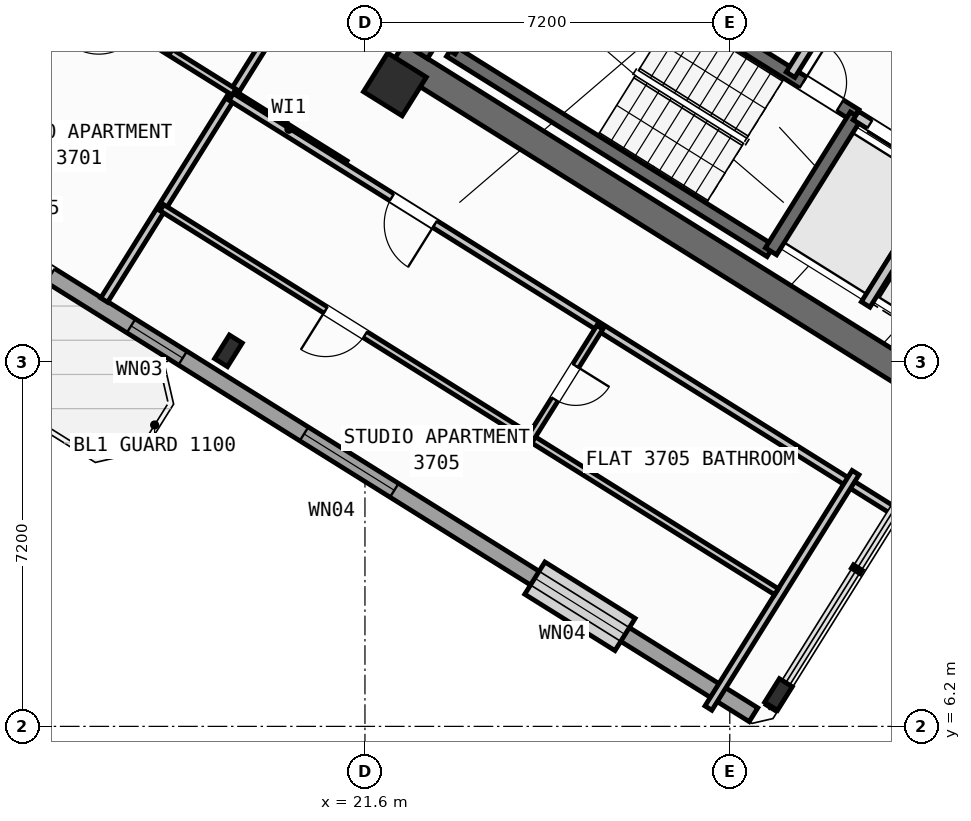
"""IFC4 building model, lengths in metres.
Left out: names, types, materials, properties, quantities, classifications, styles, units other than length and angle.
Written with IfcOpenShell. Run it as: python <this file> out.ifc"""

import sys

from ifc_helpers import new_model, si_unit, direction, frame, frame_2d, origin, origin_2d, place, context, subcontext, project, spatial, rectangle, hollow_rectangle, i_section, extrude, source, transform, mapped, element, fill, save


model = new_model("IFC4")
c1 = context("Model", 3, precision=1e-05, world=origin(), true_north=direction((0.0, 1.0)))
c2 = subcontext(c1, "Body", "Model", "MODEL_VIEW")
j1 = project(units=[si_unit("LENGTHUNIT", "METRE"), si_unit("PLANEANGLEUNIT", "RADIAN")], contexts=[c1])
p1 = place(None, origin())
s1 = spatial("IfcSite", under=j1, at=p1, CompositionType="ELEMENT")
p2 = place(p1, origin())
s2 = spatial("IfcBuilding", under=s1, at=p2, CompositionType="ELEMENT")
p3 = place(p2, frame((0.0, 0.0, 147.9)))
s3 = spatial("IfcBuildingStorey", under=s2, at=p3, CompositionType="ELEMENT", Elevation=147.9)
p4 = place(p3, frame((33.366, 12.477, 0.0), z_axis=(0.0, 0.0, 1.0), x_axis=(-0.848047359947, 0.529920442413, 0.0)))
e1 = element("IfcWall", 1, at=p4, inside=s3, PredefinedType="SHEAR", context=c2, shape_type="SweptSolid", body=[
    extrude(rectangle(XDim=13.14, YDim=0.55, at=frame_2d((6.57, 0.0))), origin(), (0.0, 0.0, 1.0), 3.35),
])
p5 = place(p3, frame((26.007, 24.976, 0.0), z_axis=(0.0, 0.0, 1.0), x_axis=(-0.529923795287, -0.848045264823, 0.0)))
e2 = element("IfcWall", 2, at=p5, inside=s3, PredefinedType="SHEAR", context=c2, shape_type="SweptSolid", body=[
    extrude(rectangle(XDim=6.425, YDim=0.55, at=frame_2d((3.212, 0.0))), origin(), (0.0, 0.0, 1.0), 3.35),
])
m1 = source(origin(), c2, "Body", "SweptSolid", [
    extrude(i_section(OverallWidth=0.3, OverallDepth=0.55, WebThickness=0.015, FlangeThickness=0.029, at=origin_2d()), origin(), (0.0, 0.0, 1.0), 3.6),
])
p6 = place(p3, frame((29.761, 6.829, 0.0), z_axis=(0.0, 0.0, 1.0), x_axis=(-0.848048096156, 0.529919264233, 0.0)))
e3 = element("IfcColumn", 3, at=p6, inside=s3, PredefinedType="COLUMN", context=c2, shape_type="MappedRepresentation", body=[
    mapped(m1, transform((0.0, 0.0, 0.0), scale=1.0)),
])
m2 = source(origin(), c2, "Body", "SweptSolid", [
    extrude(hollow_rectangle(XDim=0.9, YDim=0.9, WallThickness=0.036, at=origin_2d()), origin(), (0.0, 0.0, 1.0), 3.6),
])
p7 = place(p3, frame((22.191, 18.87, 0.0), z_axis=(0.0, 0.0, 1.0), x_axis=(-0.848048096156, 0.529919264233, 0.0)))
e4 = element("IfcColumn", 4, at=p7, inside=s3, PredefinedType="COLUMN", context=c2, shape_type="MappedRepresentation", body=[
    mapped(m2, transform((0.0, 0.0, 0.0), scale=1.0)),
])
p8 = place(p3, frame((18.906, 13.612, 0.0), z_axis=(0.0, 0.0, 1.0), x_axis=(-0.848048096156, 0.529919264233, 0.0)))
e5 = element("IfcColumn", 5, at=p8, inside=s3, PredefinedType="COLUMN", context=c2, shape_type="MappedRepresentation", body=[
    mapped(m1, transform((0.0, 0.0, 0.0), scale=1.0)),
])
p9 = place(p3, frame((29.268, 6.429, 0.0), z_axis=(0.0, 0.0, 1.0), x_axis=(-0.848049971435, 0.529916263149, 0.0)))
e6 = element("IfcWall", 6, at=p9, inside=s3, PredefinedType="STANDARD", context=c2, shape_type="SweptSolid", body=[
    extrude(rectangle(XDim=31.588, YDim=0.32, at=frame_2d((15.794, 0.0))), origin(), (0.0, 0.0, 1.0), 3.35),
])
p10 = place(p9, frame((16.362, 0.0, 0.0)))
e7 = element("IfcOpeningElement", 7, at=p10, cuts=e6, PredefinedType="OPENING", context=c2, shape_type="SweptSolid", body=[
    extrude(rectangle(XDim=1.2, YDim=2.15, at=frame_2d((0.6, 1.075))), frame((0.0, 0.17, 0.0), z_axis=(0.0, -1.0, 0.0), x_axis=(1.0, 0.0, 0.0)), (0.0, 0.0, 1.0), 0.34),
])
p11 = place(p9, frame((2.989, 0.0, 0.8)))
e8 = element("IfcOpeningElement", 8, at=p11, cuts=e6, PredefinedType="OPENING", context=c2, shape_type="SweptSolid", body=[
    extrude(rectangle(XDim=2.1, YDim=1.55, at=frame_2d((1.05, 0.775))), frame((0.0, 0.17, 0.0), z_axis=(0.0, -1.0, 0.0), x_axis=(1.0, 0.0, 0.0)), (0.0, 0.0, 1.0), 0.34),
])
p12 = place(p9, frame((8.359, 0.0, 0.8)))
e9 = element("IfcOpeningElement", 9, at=p12, cuts=e6, PredefinedType="OPENING", context=c2, shape_type="SweptSolid", body=[
    extrude(rectangle(XDim=2.1, YDim=1.55, at=frame_2d((1.05, 0.775))), frame((0.0, 0.17, 0.0), z_axis=(0.0, -1.0, 0.0), x_axis=(1.0, 0.0, 0.0)), (0.0, 0.0, 1.0), 0.34),
])
p13 = place(p9, frame((13.284, 0.0, 0.95)))
e10 = element("IfcOpeningElement", 10, at=p13, cuts=e6, PredefinedType="OPENING", context=c2, shape_type="SweptSolid", body=[
    extrude(rectangle(XDim=1.2, YDim=1.4, at=frame_2d((0.6, 0.7))), frame((0.0, 0.17, 0.0), z_axis=(0.0, -1.0, 0.0), x_axis=(1.0, 0.0, 0.0)), (0.0, 0.0, 1.0), 0.34),
])
p14 = place(p9, frame((29.188, 0.0, 0.95)))
e11 = element("IfcOpeningElement", 11, at=p14, cuts=e6, PredefinedType="OPENING", context=c2, shape_type="SweptSolid", body=[
    extrude(rectangle(XDim=1.2, YDim=1.4, at=frame_2d((0.6, 0.7))), frame((0.0, 0.17, 0.0), z_axis=(0.0, -1.0, 0.0), x_axis=(1.0, 0.0, 0.0)), (0.0, 0.0, 1.0), 0.34),
])
p15 = place(p9, frame((19.674, 0.0, 1.0)))
e12 = element("IfcOpeningElement", 12, at=p15, cuts=e6, PredefinedType="OPENING", context=c2, shape_type="SweptSolid", body=[
    extrude(rectangle(XDim=0.9, YDim=1.25, at=frame_2d((0.45, 0.625))), frame((0.0, 0.17, 0.0), z_axis=(0.0, -1.0, 0.0), x_axis=(1.0, 0.0, 0.0)), (0.0, 0.0, 1.0), 0.34),
])
p16 = place(p9, frame((21.896, 0.0, 1.0)))
e13 = element("IfcOpeningElement", 13, at=p16, cuts=e6, PredefinedType="OPENING", context=c2, shape_type="SweptSolid", body=[
    extrude(rectangle(XDim=0.9, YDim=1.25, at=frame_2d((0.45, 0.625))), frame((0.0, 0.17, 0.0), z_axis=(0.0, -1.0, 0.0), x_axis=(1.0, 0.0, 0.0)), (0.0, 0.0, 1.0), 0.34),
])
p17 = place(p9, frame((24.106, 0.0, 1.0)))
e14 = element("IfcOpeningElement", 14, at=p17, cuts=e6, PredefinedType="OPENING", context=c2, shape_type="SweptSolid", body=[
    extrude(rectangle(XDim=0.65, YDim=1.15, at=frame_2d((0.325, 0.575))), frame((0.0, 0.17, 0.0), z_axis=(0.0, -1.0, 0.0), x_axis=(1.0, 0.0, 0.0)), (0.0, 0.0, 1.0), 0.34),
])
p18 = place(p9, frame((26.366, 0.0, 1.0)))
e15 = element("IfcOpeningElement", 15, at=p18, cuts=e6, PredefinedType="OPENING", context=c2, shape_type="SweptSolid", body=[
    extrude(rectangle(XDim=0.9, YDim=1.25, at=frame_2d((0.45, 0.625))), frame((0.0, 0.17, 0.0), z_axis=(0.0, -1.0, 0.0), x_axis=(1.0, 0.0, 0.0)), (0.0, 0.0, 1.0), 0.34),
])
p19 = place(p3, frame((29.605, 15.581, 0.0), z_axis=(0.0, 0.0, 1.0), x_axis=(-0.848036911448, 0.529937163087, 0.0)))
e16 = element("IfcWall", 16, at=p19, inside=s3, PredefinedType="SHEAR", context=c2, shape_type="SweptSolid", body=[
    extrude(rectangle(XDim=7.46, YDim=0.26, at=frame_2d((3.73, 0.0))), origin(), (0.0, 0.0, 1.0), 3.35),
])
p20 = place(p3, frame((31.28, 18.261, 0.0), z_axis=(0.0, 0.0, 1.0), x_axis=(-0.848051618787, 0.529913626805, 0.0)))
e17 = element("IfcWall", 17, at=p20, inside=s3, PredefinedType="SHEAR", context=c2, shape_type="SweptSolid", body=[
    extrude(rectangle(XDim=7.46, YDim=0.26, at=frame_2d((3.73, 0.0))), origin(), (0.0, 0.0, 1.0), 3.35),
])
p21 = place(p20, frame((0.36, 0.0, 0.0)))
e18 = element("IfcOpeningElement", 18, at=p21, cuts=e17, PredefinedType="OPENING", context=c2, shape_type="SweptSolid", body=[
    extrude(rectangle(XDim=0.86, YDim=2.05, at=frame_2d((0.43, 1.025))), frame((0.0, 0.14, 0.0), z_axis=(0.0, -1.0, 0.0), x_axis=(1.0, 0.0, 0.0)), (0.0, 0.0, 1.0), 0.28),
])
p22 = place(p3, frame((31.288, 18.256, 0.0), z_axis=(0.0, 0.0, 1.0), x_axis=(-0.529943379326, -0.848033026897, 0.0)))
e19 = element("IfcWall", 19, at=p22, inside=s3, PredefinedType="SHEAR", context=c2, shape_type="SweptSolid", body=[
    extrude(rectangle(XDim=3.16, YDim=0.26, at=frame_2d((1.58, 0.0))), origin(), (0.0, 0.0, 1.0), 3.35),
])
p23 = place(p3, frame((24.945, 22.22, 0.0), z_axis=(0.0, 0.0, 1.0), x_axis=(-0.529908658664, -0.84805472316, 0.0)))
e20 = element("IfcWall", 20, at=p23, inside=s3, PredefinedType="SHEAR", context=c2, shape_type="SweptSolid", body=[
    extrude(rectangle(XDim=3.16, YDim=0.26, at=frame_2d((1.58, 0.0))), origin(), (0.0, 0.0, 1.0), 3.35),
])
p24 = place(p3, frame((34.891, 16.005, 0.0), z_axis=(0.0, 0.0, 1.0), x_axis=(-0.848062873452, 0.529895614884, 0.0)))
e21 = element("IfcWall", 21, at=p24, inside=s3, PredefinedType="STANDARD", context=c2, shape_type="SweptSolid", body=[
    extrude(rectangle(XDim=4.248, YDim=0.2, at=frame_2d((2.124, 0.0))), origin(), (0.0, 0.0, 1.0), 3.34),
])
p25 = place(p24, frame((0.398, 0.0, 0.0)))
e22 = element("IfcOpeningElement", 22, at=p25, cuts=e21, PredefinedType="OPENING", context=c2, shape_type="SweptSolid", body=[
    extrude(rectangle(XDim=1.3, YDim=2.2, at=frame_2d((0.65, 1.1))), frame((0.0, 0.11, 0.0), z_axis=(0.0, -1.0, 0.0), x_axis=(1.0, 0.0, 0.0)), (0.0, 0.0, 1.0), 0.22),
])
p26 = place(p24, frame((2.473, 0.0, 0.0)))
e23 = element("IfcOpeningElement", 23, at=p26, cuts=e21, PredefinedType="OPENING", context=c2, shape_type="SweptSolid", body=[
    extrude(rectangle(XDim=1.45, YDim=2.25, at=frame_2d((0.725, 1.125))), frame((0.0, 0.11, 0.0), z_axis=(0.0, -1.0, 0.0), x_axis=(1.0, 0.0, 0.0)), (0.0, 0.0, 1.0), 0.22),
])
p27 = place(p3, frame((36.417, 18.447, 0.0), z_axis=(0.0, 0.0, 1.0), x_axis=(-0.848064879198, 0.529892404805, 0.0)))
e24 = element("IfcWall", 24, at=p27, inside=s3, PredefinedType="STANDARD", context=c2, shape_type="SweptSolid", body=[
    extrude(rectangle(XDim=5.768, YDim=0.2, at=frame_2d((2.884, 0.0))), origin(), (0.0, 0.0, 1.0), 3.34),
])
p28 = place(p27, frame((2.548, 0.0, 0.0)))
e25 = element("IfcOpeningElement", 25, at=p28, cuts=e24, PredefinedType="OPENING", context=c2, shape_type="SweptSolid", body=[
    extrude(rectangle(XDim=1.15, YDim=2.1, at=frame_2d((0.575, 1.05))), frame((0.0, 0.11, 0.0), z_axis=(0.0, -1.0, 0.0), x_axis=(1.0, 0.0, 0.0)), (0.0, 0.0, 1.0), 0.22),
])
p29 = place(p3, frame((33.029, 17.003, 0.0), z_axis=(0.0, 0.0, 1.0), x_axis=(-0.529916267533, -0.848049968695, 0.0)))
e26 = element("IfcWall", 26, at=p29, inside=s3, PredefinedType="STANDARD", context=c2, shape_type="SweptSolid", body=[
    extrude(rectangle(XDim=2.92, YDim=0.2, at=frame_2d((1.46, 0.0))), origin(), (0.0, 0.0, 1.0), 3.34),
])
p30 = place(p3, frame((31.525, 21.504, 0.0), z_axis=(0.0, 0.0, 1.0), x_axis=(-0.529907497854, -0.848055448493, 0.0)))
e27 = element("IfcWall", 27, at=p30, inside=s3, PredefinedType="STANDARD", context=c2, shape_type="SweptSolid", body=[
    extrude(rectangle(XDim=2.88, YDim=0.2, at=frame_2d((1.44, 0.0))), origin(), (0.0, 0.0, 1.0), 3.34),
])
p31 = place(p3, frame((21.206, 17.292, 0.0), z_axis=(0.0, 0.0, 1.0), x_axis=(-0.848050851465, 0.529914854792, 0.0)))
e28 = element("IfcWall", 28, at=p31, inside=s3, PredefinedType="PARTITIONING", context=c2, shape_type="SweptSolid", body=[
    extrude(rectangle(XDim=2.61, YDim=0.16, at=frame_2d((1.305, 0.0))), origin(), (0.0, 0.0, 1.0), 3.34),
])
p32 = place(p3, frame((21.938, 23.391, 0.0), z_axis=(0.0, 0.0, 1.0), x_axis=(-0.529924725692, -0.848044683434, 0.0)))
e29 = element("IfcWall", 29, at=p32, inside=s3, PredefinedType="PARTITIONING", context=c2, shape_type="SweptSolid", body=[
    extrude(rectangle(XDim=10.35, YDim=0.16, at=frame_2d((5.175, 0.0))), origin(), (0.0, 0.0, 1.0), 3.34),
])
p33 = place(p3, frame((16.519, 21.87, 0.0), z_axis=(0.0, 0.0, 1.0), x_axis=(-0.529922447305, -0.848046107144, 0.0)))
e30 = element("IfcWall", 30, at=p33, inside=s3, PredefinedType="PARTITIONING", context=c2, shape_type="SweptSolid", body=[
    extrude(rectangle(XDim=5.451, YDim=0.16, at=frame_2d((2.726, 0.0))), origin(), (0.0, 0.0, 1.0), 2.775),
])
p34 = place(p3, frame((19.019, 18.718, 0.0), z_axis=(0.0, 0.0, 1.0), x_axis=(-0.848059820872, 0.529900500304, 0.0)))
e31 = element("IfcWall", 31, at=p34, inside=s3, PredefinedType="PLUMBINGWALL", context=c2, shape_type="SweptSolid", body=[
    extrude(rectangle(XDim=3.79, YDim=0.14, at=frame_2d((1.895, 0.0))), origin(), (0.0, 0.0, 1.0), 3.34),
])
p35 = place(p34, frame((2.23, 0.0, 0.0)))
e32 = element("IfcOpeningElement", 32, at=p35, cuts=e31, PredefinedType="OPENING", context=c2, shape_type="SweptSolid", body=[
    extrude(rectangle(XDim=0.92, YDim=2.08, at=frame_2d((0.46, 1.04))), frame((0.0, 0.08, 0.0), z_axis=(0.0, -1.0, 0.0), x_axis=(1.0, 0.0, 0.0)), (0.0, 0.0, 1.0), 0.16),
])
p36 = place(p3, frame((20.624, 24.212, 0.0), z_axis=(0.0, 0.0, 1.0), x_axis=(-0.529919283494, -0.848048084121, 0.0)))
e33 = element("IfcWall", 33, at=p36, inside=s3, PredefinedType="PLUMBINGWALL", context=c2, shape_type="SweptSolid", body=[
    extrude(rectangle(XDim=5.51, YDim=0.14, at=frame_2d((2.755, 0.0))), origin(), (0.0, 0.0, 1.0), 2.995),
])
p37 = place(p36, frame((2.365, 0.0, 0.0)))
e34 = element("IfcOpeningElement", 34, at=p37, cuts=e33, PredefinedType="OPENING", context=c2, shape_type="SweptSolid", body=[
    extrude(rectangle(XDim=0.78, YDim=2.05, at=frame_2d((0.39, 1.025))), frame((0.0, 0.08, 0.0), z_axis=(0.0, -1.0, 0.0), x_axis=(1.0, 0.0, 0.0)), (0.0, 0.0, 1.0), 0.16),
])
p38 = place(p3, frame((32.164, 10.374, 0.0), z_axis=(0.0, 0.0, 1.0), x_axis=(-0.848044107957, 0.529925646633, 0.0)))
e35 = element("IfcWall", 35, at=p38, inside=s3, PredefinedType="PARTITIONING", context=c2, shape_type="SweptSolid", body=[
    extrude(rectangle(XDim=15.57, YDim=0.16, at=frame_2d((7.785, 0.0))), origin(), (0.0, 0.0, 1.0), 3.34),
])
p39 = place(p38, frame((10.83, 0.0, 0.0)))
e36 = element("IfcOpeningElement", 36, at=p39, cuts=e35, PredefinedType="OPENING", context=c2, shape_type="SweptSolid", body=[
    extrude(rectangle(XDim=1.0, YDim=2.1, at=frame_2d((0.5, 1.05))), frame((0.0, 0.09, 0.0), z_axis=(0.0, -1.0, 0.0), x_axis=(1.0, 0.0, 0.0)), (0.0, 0.0, 1.0), 0.18),
])
p40 = place(p3, frame((31.282, 11.208, 0.0), z_axis=(0.0, 0.0, 1.0), x_axis=(-0.529938869374, -0.84803584519, 0.0)))
e37 = element("IfcWall", 37, at=p40, inside=s3, PredefinedType="PARTITIONING", context=c2, shape_type="SweptSolid", body=[
    extrude(rectangle(XDim=5.48, YDim=0.16, at=frame_2d((2.74, 0.0))), origin(), (0.0, 0.0, 1.0), 3.34),
])
p41 = place(p3, frame((29.72, 8.859, 0.0), z_axis=(0.0, 0.0, 1.0), x_axis=(-0.848049134363, 0.529917602752, 0.0)))
e38 = element("IfcWall", 38, at=p41, inside=s3, PredefinedType="PLUMBINGWALL", context=c2, shape_type="SweptSolid", body=[
    extrude(rectangle(XDim=14.3, YDim=0.14, at=frame_2d((7.15, 0.0))), origin(), (0.0, 0.0, 1.0), 3.34),
])
p42 = place(p41, frame((9.57, 0.0, 0.0)))
e39 = element("IfcOpeningElement", 39, at=p42, cuts=e38, PredefinedType="OPENING", context=c2, shape_type="SweptSolid", body=[
    extrude(rectangle(XDim=0.92, YDim=2.08, at=frame_2d((0.46, 1.04))), frame((0.0, 0.08, 0.0), z_axis=(0.0, -1.0, 0.0), x_axis=(1.0, 0.0, 0.0)), (0.0, 0.0, 1.0), 0.16),
])
p43 = place(p3, frame((26.237, 14.078, 0.0), z_axis=(0.0, 0.0, 1.0), x_axis=(-0.52995640672, -0.848024885824, 0.0)))
e40 = element("IfcWall", 40, at=p43, inside=s3, PredefinedType="PLUMBINGWALL", context=c2, shape_type="SweptSolid", body=[
    extrude(rectangle(XDim=2.58, YDim=0.14, at=frame_2d((1.29, 0.0))), origin(), (0.0, 0.0, 1.0), 3.34),
])
p44 = place(p43, frame((0.9, 0.0, 0.0)))
e41 = element("IfcOpeningElement", 41, at=p44, cuts=e40, PredefinedType="OPENING", context=c2, shape_type="SweptSolid", body=[
    extrude(rectangle(XDim=0.78, YDim=2.05, at=frame_2d((0.39, 1.025))), frame((0.0, 0.08, 0.0), z_axis=(0.0, -1.0, 0.0), x_axis=(1.0, 0.0, 0.0)), (0.0, 0.0, 1.0), 0.16),
])
m3 = source(origin(), c2, "Body", "SweptSolid", [
    extrude(rectangle(XDim=2.1, YDim=1.55, at=frame_2d((1.05, 0.775))), frame((0.0, 0.03, 0.0), z_axis=(0.0, -1.0, 0.0), x_axis=(1.0, 0.0, 0.0)), (0.0, 0.0, 1.0), 0.06),
])
p45 = place(p11, origin())
e42 = element("IfcWindow", 42, at=p45, inside=s3, PartitioningType="SINGLE_PANEL", PredefinedType="WINDOW", context=c2, shape_type="MappedRepresentation", body=[
    mapped(m3, transform((0.0, 0.0, 0.0), scale=1.0)),
])
fill(e8, e42)
p46 = place(p12, origin())
e43 = element("IfcWindow", 43, at=p46, inside=s3, PartitioningType="SINGLE_PANEL", PredefinedType="WINDOW", context=c2, shape_type="MappedRepresentation", body=[
    mapped(m3, transform((0.0, 0.0, 0.0), scale=1.0)),
])
fill(e9, e43)
m4 = source(origin(), c2, "Body", "SweptSolid", [
    extrude(rectangle(XDim=1.2, YDim=1.4, at=frame_2d((0.6, 0.7))), frame((0.0, 0.03, 0.0), z_axis=(0.0, -1.0, 0.0), x_axis=(1.0, 0.0, 0.0)), (0.0, 0.0, 1.0), 0.06),
])
p47 = place(p13, origin())
e44 = element("IfcWindow", 44, at=p47, inside=s3, PartitioningType="SINGLE_PANEL", PredefinedType="WINDOW", context=c2, shape_type="MappedRepresentation", body=[
    mapped(m4, transform((0.0, 0.0, 0.0), scale=1.0)),
])
fill(e10, e44)
m5 = source(origin(), c2, "Body", "SweptSolid", [
    extrude(rectangle(XDim=0.86, YDim=2.05, at=frame_2d((0.43, 1.025))), frame((0.0, 0.025, 0.0), z_axis=(0.0, -1.0, 0.0), x_axis=(1.0, 0.0, 0.0)), (0.0, 0.0, 1.0), 0.05),
])
p48 = place(p21, frame((0.86, 0.0, 0.0), z_axis=(0.0, 0.0, 1.0), x_axis=(-1.0, 0.0, 0.0)))
e45 = element("IfcDoor", 45, at=p48, inside=s3, OperationType="SINGLE_SWING_LEFT", PredefinedType="DOOR", context=c2, shape_type="MappedRepresentation", body=[
    mapped(m5, transform((0.0, 0.0, 0.0), scale=1.0)),
])
fill(e18, e45)
m6 = source(origin(), c2, "Body", "SweptSolid", [
    extrude(rectangle(XDim=1.45, YDim=2.25, at=frame_2d((0.725, 1.125))), frame((0.0, 0.025, 0.0), z_axis=(0.0, -1.0, 0.0), x_axis=(1.0, 0.0, 0.0)), (0.0, 0.0, 1.0), 0.05),
])
p49 = place(p26, origin())
e46 = element("IfcDoor", 46, at=p49, inside=s3, OperationType="DOUBLE_DOOR_SLIDING", PredefinedType="DOOR", context=c2, shape_type="MappedRepresentation", body=[
    mapped(m6, transform((0.0, 0.0, 0.0), scale=1.0)),
])
fill(e23, e46)
m7 = source(origin(), c2, "Body", "SweptSolid", [
    extrude(rectangle(XDim=1.0, YDim=2.1, at=frame_2d((0.5, 1.05))), frame((0.0, 0.025, 0.0), z_axis=(0.0, -1.0, 0.0), x_axis=(1.0, 0.0, 0.0)), (0.0, 0.0, 1.0), 0.05),
])
p50 = place(p39, origin())
e47 = element("IfcDoor", 47, at=p50, inside=s3, OperationType="SINGLE_SWING_LEFT", PredefinedType="DOOR", context=c2, shape_type="MappedRepresentation", body=[
    mapped(m7, transform((0.0, 0.0, 0.0), scale=1.0)),
])
fill(e36, e47)
m8 = source(origin(), c2, "Body", "SweptSolid", [
    extrude(rectangle(XDim=0.92, YDim=2.08, at=frame_2d((0.46, 1.04))), frame((0.0, 0.025, 0.0), z_axis=(0.0, -1.0, 0.0), x_axis=(1.0, 0.0, 0.0)), (0.0, 0.0, 1.0), 0.05),
])
p51 = place(p42, origin())
e48 = element("IfcDoor", 48, at=p51, inside=s3, OperationType="SINGLE_SWING_RIGHT", PredefinedType="DOOR", context=c2, shape_type="MappedRepresentation", body=[
    mapped(m8, transform((0.0, 0.0, 0.0), scale=1.0)),
])
fill(e39, e48)
m9 = source(origin(), c2, "Body", "SweptSolid", [
    extrude(rectangle(XDim=0.78, YDim=2.05, at=frame_2d((0.39, 1.025))), frame((0.0, 0.025, 0.0), z_axis=(0.0, -1.0, 0.0), x_axis=(1.0, 0.0, 0.0)), (0.0, 0.0, 1.0), 0.05),
])
p52 = place(p44, origin())
e49 = element("IfcDoor", 49, at=p52, inside=s3, OperationType="SINGLE_SWING_LEFT", PredefinedType="DOOR", context=c2, shape_type="MappedRepresentation", body=[
    mapped(m9, transform((0.0, 0.0, 0.0), scale=1.0)),
])
fill(e41, e49)
save(model, sys.argv[1])
